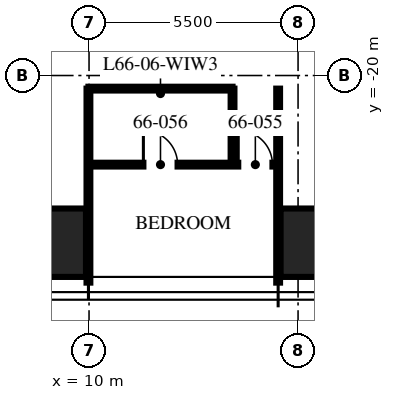
"""IFC4 building model, lengths in metres.
Left out: names, types, materials, properties, quantities, classifications, styles, units other than length and angle.
Written with IfcOpenShell. Run it as: python <this file> out.ifc"""

import sys

from ifc_helpers import new_model, si_unit, direction, frame, frame_2d, origin, origin_2d, place, context, subcontext, project, spatial, rectangle, hollow_rectangle, extrude, element, fill, save


model = new_model("IFC4")
c1 = context("Model", 3, precision=1e-05, world=origin(), true_north=direction((0.0, 1.0)))
c2 = subcontext(c1, "Body", "Model", "MODEL_VIEW")
j1 = project(units=[si_unit("LENGTHUNIT", "METRE"), si_unit("PLANEANGLEUNIT", "RADIAN")], contexts=[c1])
p1 = place(None, origin())
s1 = spatial("IfcSite", under=j1, at=p1, CompositionType="ELEMENT")
p2 = place(p1, origin())
s2 = spatial("IfcBuilding", under=s1, at=p2, CompositionType="ELEMENT")
p3 = place(p2, frame((0.0, 0.0, 263.25)))
s3 = spatial("IfcBuildingStorey", under=s2, at=p3, CompositionType="ELEMENT", Elevation=263.25)
for number, where, z_axis, x_axis in (
    (1, (16.64, -24.4, 0.0), (0.0, 0.0, 1.0), (1.0, 0.0, 0.0)),
    (2, (8.32, -24.4, 0.0), (0.0, 0.0, 1.0), (1.0, 0.0, 0.0)),
):
    element("IfcColumn", number, at=place(p3, frame(where, z_axis=z_axis, x_axis=x_axis)), inside=s3, PredefinedType="COLUMN", context=c2, shape_type="SweptSolid", body=[
        extrude(hollow_rectangle(XDim=3.2, YDim=1.8, WallThickness=0.14, at=origin_2d()), origin(), (0.0, 0.0, 1.0), 3.75),
    ])
for number, where, z_axis, x_axis in (
    (3, (9.984, -20.345, 0.0), (0.0, 0.0, 1.0), (0.0, -1.0, 0.0)),
    (4, (14.976, -20.345, 0.0), (0.0, 0.0, 1.0), (0.0, -1.0, 0.0)),
):
    element("IfcWall", number, at=place(p3, frame(where, z_axis=z_axis, x_axis=x_axis)), inside=s3, PredefinedType="PARTITIONING", context=c2, shape_type="SweptSolid", body=[
        extrude(rectangle(XDim=5.105, YDim=0.1, at=frame_2d((2.552, 0.0))), origin(), (0.0, 0.0, 1.0), 2.91),
    ])
p4 = place(p3, frame((9.984, -22.345, 0.0), z_axis=(0.0, 0.0, 1.0), x_axis=(1.0, 0.0, 0.0)))
e5 = element("IfcWall", 5, at=p4, inside=s3, PredefinedType="PARTITIONING", context=c2, shape_type="SweptSolid", body=[
    extrude(rectangle(XDim=4.992, YDim=0.1, at=frame_2d((2.496, 0.0))), origin(), (0.0, 0.0, 1.0), 2.81),
])
p5 = place(p4, frame((3.942, 0.0, 0.0)))
e6 = element("IfcOpeningElement", 6, at=p5, cuts=e5, PredefinedType="OPENING", context=c2, shape_type="SweptSolid", body=[
    extrude(rectangle(XDim=0.9, YDim=2.1, at=frame_2d((0.45, 1.05))), frame((0.0, 0.06, 0.0), z_axis=(0.0, -1.0, 0.0), x_axis=(1.0, 0.0, 0.0)), (0.0, 0.0, 1.0), 0.12),
])
p6 = place(p4, frame((1.446, 0.0, 0.0)))
e7 = element("IfcOpeningElement", 7, at=p6, cuts=e5, PredefinedType="OPENING", context=c2, shape_type="SweptSolid", body=[
    extrude(rectangle(XDim=0.9, YDim=2.1, at=frame_2d((0.45, 1.05))), frame((0.0, 0.06, 0.0), z_axis=(0.0, -1.0, 0.0), x_axis=(1.0, 0.0, 0.0)), (0.0, 0.0, 1.0), 0.12),
])
p7 = place(p3, frame((13.776, -20.345, 0.0), z_axis=(0.0, 0.0, 1.0), x_axis=(0.0, -1.0, 0.0)))
e8 = element("IfcWall", 8, at=p7, inside=s3, PredefinedType="PARTITIONING", context=c2, shape_type="SweptSolid", body=[
    extrude(rectangle(XDim=2.0, YDim=0.1, at=frame_2d((1.0, 0.0))), origin(), (0.0, 0.0, 1.0), 3.5),
])
p8 = place(p3, frame((9.984, -20.345, 0.0), z_axis=(0.0, 0.0, 1.0), x_axis=(1.0, 0.0, 0.0)))
e9 = element("IfcWall", 9, at=p8, inside=s3, PredefinedType="PARTITIONING", context=c2, shape_type="SweptSolid", body=[
    extrude(rectangle(XDim=3.792, YDim=0.1, at=frame_2d((1.896, 0.0))), origin(), (0.0, 0.0, 1.0), 2.81),
])
p9 = place(p5, origin())
e10 = element("IfcDoor", 10, at=p9, inside=s3, OperationType="SINGLE_SWING_LEFT", PredefinedType="DOOR", context=c2, shape_type="SweptSolid", body=[
    extrude(rectangle(XDim=0.9, YDim=2.1, at=frame_2d((0.45, 1.05))), frame((0.0, 0.025, 0.0), z_axis=(0.0, -1.0, 0.0), x_axis=(1.0, 0.0, 0.0)), (0.0, 0.0, 1.0), 0.05),
])
fill(e6, e10)
p10 = place(p6, origin())
e11 = element("IfcDoor", 11, at=p10, inside=s3, OperationType="SINGLE_SWING_LEFT", PredefinedType="DOOR", context=c2, shape_type="SweptSolid", body=[
    extrude(rectangle(XDim=0.9, YDim=2.1, at=frame_2d((0.45, 1.05))), frame((0.0, 0.025, 0.0), z_axis=(0.0, -1.0, 0.0), x_axis=(1.0, 0.0, 0.0)), (0.0, 0.0, 1.0), 0.05),
])
fill(e7, e11)
save(model, sys.argv[1])
